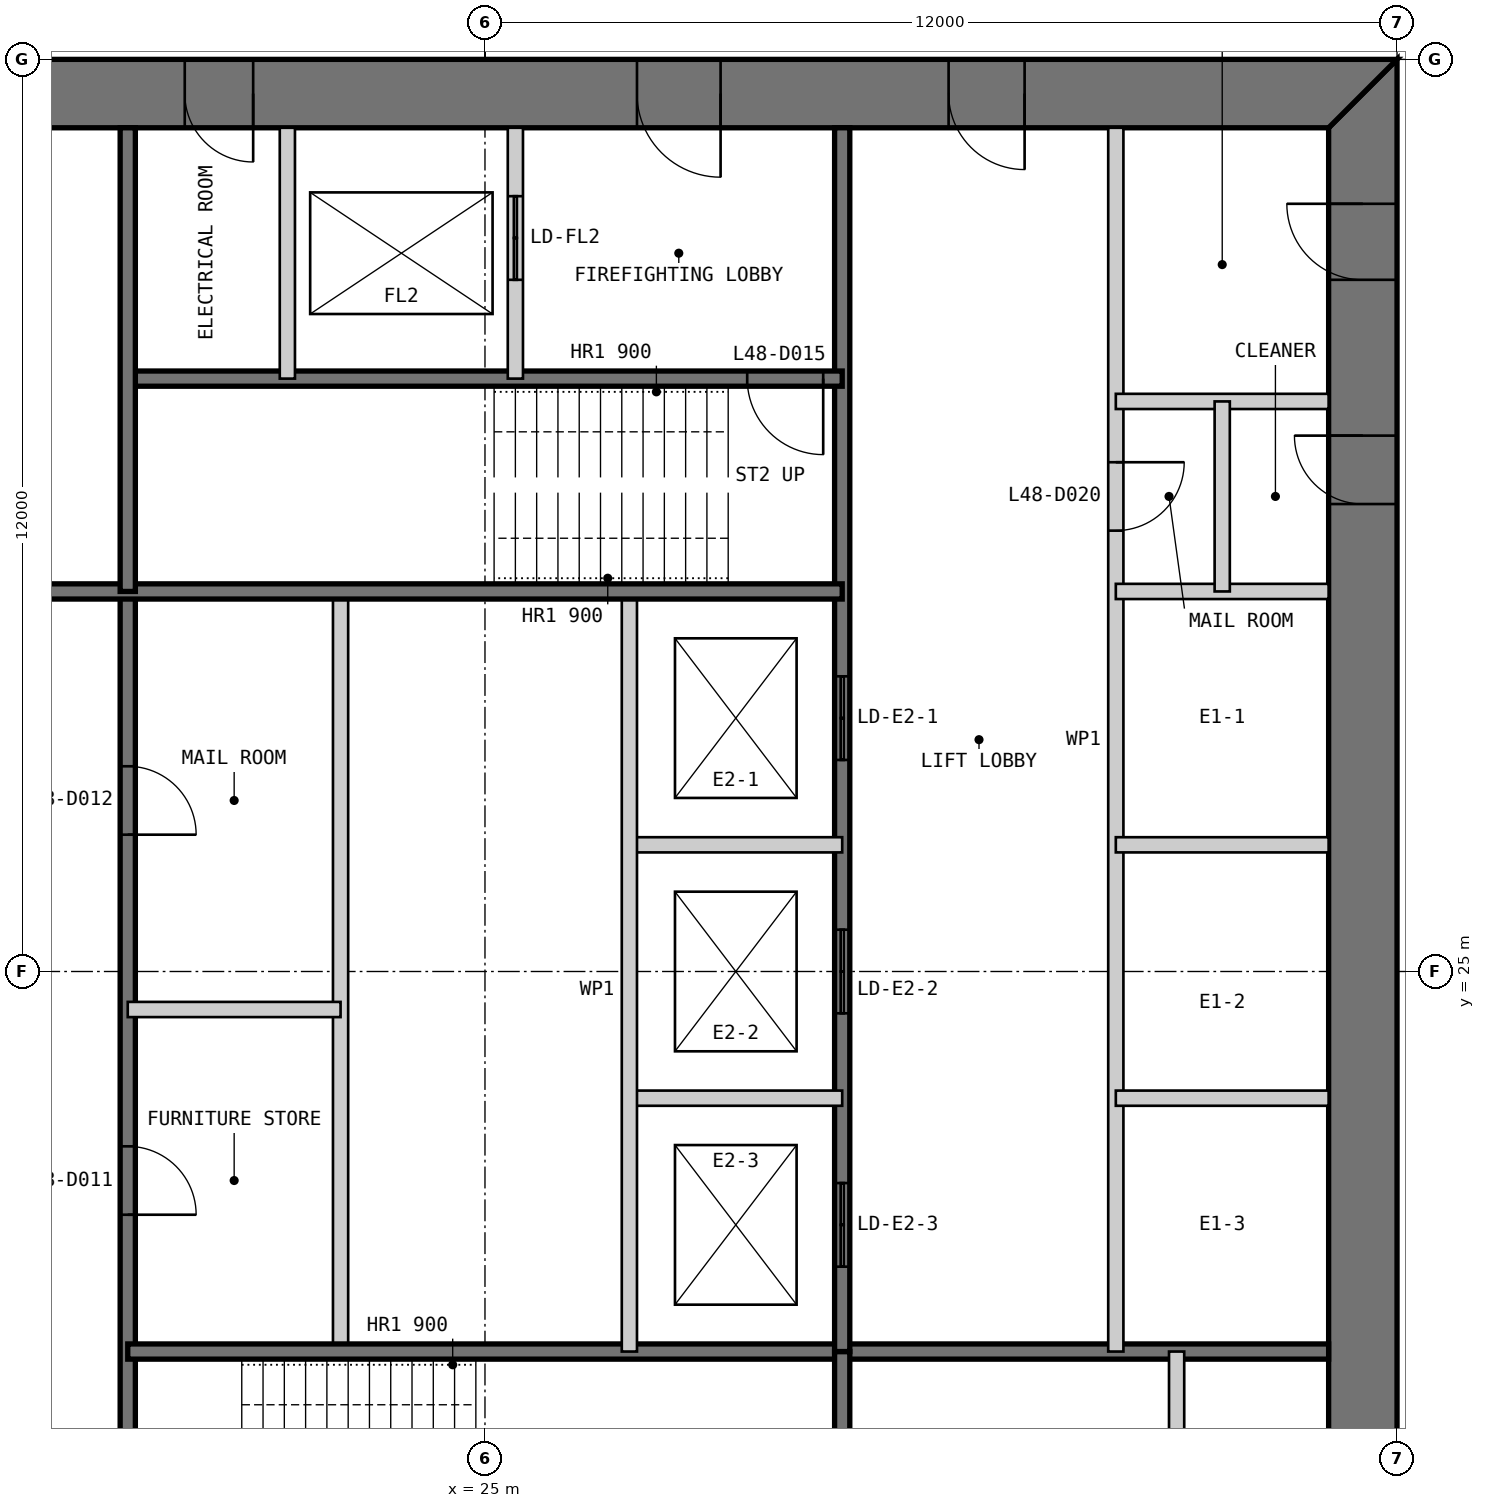
"""IFC4 building model, lengths in metres.
Left out: names, types, materials, properties, quantities, classifications, styles, units other than length and angle.
Written with IfcOpenShell. Run it as: python <this file> out.ifc"""

import sys

from ifc_helpers import new_model, si_unit, direction, frame, frame_2d, origin, place, context, subcontext, project, spatial, polyline, rectangle, outline, extrude, element, fill, save


model = new_model("IFC4")
c1 = context("Model", 3, precision=1e-05, world=origin(), true_north=direction((0.0, 1.0)))
c2 = subcontext(c1, "Body", "Model", "MODEL_VIEW")
j1 = project(units=[si_unit("LENGTHUNIT", "METRE"), si_unit("PLANEANGLEUNIT", "RADIAN")], contexts=[c1])
p1 = place(None, origin())
s1 = spatial("IfcSite", under=j1, at=p1, CompositionType="ELEMENT")
p2 = place(p1, origin())
s2 = spatial("IfcBuilding", under=s1, at=p2, CompositionType="ELEMENT")
p3 = place(p2, frame((0.0, 0.0, 205.8)))
s3 = spatial("IfcBuildingStorey", under=s2, at=p3, CompositionType="ELEMENT", Elevation=205.8)
p4 = place(p3, frame((36.55, 13.9, 0.0), z_axis=(0.0, 0.0, 1.0), x_axis=(0.0, 1.0, 0.0)))
e1 = element("IfcWall", 1, at=p4, inside=s3, PredefinedType="SHEAR", context=c2, shape_type="SweptSolid", body=[
    extrude(outline(polyline([(-0.9, -0.45), (23.1, -0.45), (22.2, 0.45), (0.0, 0.45), (-0.9, -0.45)])), origin(), (0.0, 0.0, 1.0), 4.0),
])
p5 = place(p4, frame((20.2, 0.0, 0.0)))
e2 = element("IfcOpeningElement", 2, at=p5, cuts=e1, PredefinedType="OPENING", context=c2, shape_type="SweptSolid", body=[
    extrude(rectangle(XDim=1.0, YDim=2.2, at=frame_2d((0.5, 1.1))), frame((0.0, 0.46, 0.0), z_axis=(0.0, -1.0, 0.0), x_axis=(1.0, 0.0, 0.0)), (0.0, 0.0, 1.0), 0.92),
])
p6 = place(p4, frame((17.25, 0.0, 0.0)))
e3 = element("IfcOpeningElement", 3, at=p6, cuts=e1, PredefinedType="OPENING", context=c2, shape_type="SweptSolid", body=[
    extrude(rectangle(XDim=0.9, YDim=2.2, at=frame_2d((0.45, 1.1))), frame((0.0, 0.46, 0.0), z_axis=(0.0, -1.0, 0.0), x_axis=(1.0, 0.0, 0.0)), (0.0, 0.0, 1.0), 0.92),
])
p7 = place(p3, frame((37.0, 36.55, 0.0), z_axis=(0.0, 0.0, 1.0), x_axis=(-1.0, 0.0, 0.0)))
e4 = element("IfcWall", 4, at=p7, inside=s3, PredefinedType="SHEAR", context=c2, shape_type="SweptSolid", body=[
    extrude(outline(polyline([(0.0, -0.45), (24.0, -0.45), (23.1, 0.45), (0.9, 0.45), (0.0, -0.45)])), origin(), (0.0, 0.0, 1.0), 4.0),
])
p8 = place(p7, frame((4.9, 0.0, 0.0)))
e5 = element("IfcOpeningElement", 5, at=p8, cuts=e4, PredefinedType="OPENING", context=c2, shape_type="SweptSolid", body=[
    extrude(rectangle(XDim=1.0, YDim=2.2, at=frame_2d((0.5, 1.1))), frame((0.0, 0.46, 0.0), z_axis=(0.0, -1.0, 0.0), x_axis=(1.0, 0.0, 0.0)), (0.0, 0.0, 1.0), 0.92),
])
p9 = place(p7, frame((8.9, 0.0, 0.0)))
e6 = element("IfcOpeningElement", 6, at=p9, cuts=e4, PredefinedType="OPENING", context=c2, shape_type="SweptSolid", body=[
    extrude(rectangle(XDim=1.1, YDim=2.2, at=frame_2d((0.55, 1.1))), frame((0.0, 0.46, 0.0), z_axis=(0.0, -1.0, 0.0), x_axis=(1.0, 0.0, 0.0)), (0.0, 0.0, 1.0), 0.92),
])
p10 = place(p7, frame((15.05, 0.0, 0.0)))
e7 = element("IfcOpeningElement", 7, at=p10, cuts=e4, PredefinedType="OPENING", context=c2, shape_type="SweptSolid", body=[
    extrude(rectangle(XDim=0.9, YDim=2.2, at=frame_2d((0.45, 1.1))), frame((0.0, 0.46, 0.0), z_axis=(0.0, -1.0, 0.0), x_axis=(1.0, 0.0, 0.0)), (0.0, 0.0, 1.0), 0.92),
])
p11 = place(p7, frame((17.9, 0.0, 0.0)))
e8 = element("IfcOpeningElement", 8, at=p11, cuts=e4, PredefinedType="OPENING", context=c2, shape_type="SweptSolid", body=[
    extrude(rectangle(XDim=1.0, YDim=2.2, at=frame_2d((0.5, 1.1))), frame((0.0, 0.46, 0.0), z_axis=(0.0, -1.0, 0.0), x_axis=(1.0, 0.0, 0.0)), (0.0, 0.0, 1.0), 0.92),
])
p12 = place(p7, frame((21.4, 0.0, 0.0)))
e9 = element("IfcOpeningElement", 9, at=p12, cuts=e4, PredefinedType="OPENING", context=c2, shape_type="SweptSolid", body=[
    extrude(rectangle(XDim=1.0, YDim=2.2, at=frame_2d((0.5, 1.1))), frame((0.0, 0.46, 0.0), z_axis=(0.0, -1.0, 0.0), x_axis=(1.0, 0.0, 0.0)), (0.0, 0.0, 1.0), 0.92),
])
p13 = place(p3, frame((20.3, 13.9, 0.0), z_axis=(0.0, 0.0, 1.0), x_axis=(0.0, 1.0, 0.0)))
e10 = element("IfcWall", 10, at=p13, inside=s3, PredefinedType="SOLIDWALL", context=c2, shape_type="SweptSolid", body=[
    extrude(rectangle(XDim=16.1, YDim=0.2, at=frame_2d((8.05, 0.0))), origin(), (0.0, 0.0, 1.0), 3.8),
])
p14 = place(p13, frame((7.9, 0.0, 0.0)))
e11 = element("IfcOpeningElement", 11, at=p14, cuts=e10, PredefinedType="OPENING", context=c2, shape_type="SweptSolid", body=[
    extrude(rectangle(XDim=0.9, YDim=2.2, at=frame_2d((0.45, 1.1))), frame((0.0, 0.11, 0.0), z_axis=(0.0, -1.0, 0.0), x_axis=(1.0, 0.0, 0.0)), (0.0, 0.0, 1.0), 0.22),
])
p15 = place(p13, frame((12.9, 0.0, 0.0)))
e12 = element("IfcOpeningElement", 12, at=p15, cuts=e10, PredefinedType="OPENING", context=c2, shape_type="SweptSolid", body=[
    extrude(rectangle(XDim=0.9, YDim=2.2, at=frame_2d((0.45, 1.1))), frame((0.0, 0.11, 0.0), z_axis=(0.0, -1.0, 0.0), x_axis=(1.0, 0.0, 0.0)), (0.0, 0.0, 1.0), 0.22),
])
p16 = place(p3, frame((23.1, 20.0, 0.0), z_axis=(0.0, 0.0, 1.0), x_axis=(0.0, 1.0, 0.0)))
e13 = element("IfcWall", 13, at=p16, inside=s3, PredefinedType="PARTITIONING", context=c2, shape_type="SweptSolid", body=[
    extrude(rectangle(XDim=10.0, YDim=0.2, at=frame_2d((5.0, 0.0))), origin(), (0.0, 0.0, 1.0), 3.8),
])
p17 = place(p3, frame((20.3, 20.0, 0.0), z_axis=(0.0, 0.0, 1.0), x_axis=(1.0, 0.0, 0.0)))
e14 = element("IfcWall", 14, at=p17, inside=s3, PredefinedType="SOLIDWALL", context=c2, shape_type="SweptSolid", body=[
    extrude(rectangle(XDim=15.8, YDim=0.2, at=frame_2d((7.9, 0.0))), origin(), (0.0, 0.0, 1.0), 3.8),
])
p18 = place(p3, frame((29.7, 13.9, 0.0), z_axis=(0.0, 0.0, 1.0), x_axis=(0.0, 1.0, 0.0)))
e15 = element("IfcWall", 15, at=p18, inside=s3, PredefinedType="SOLIDWALL", context=c2, shape_type="SweptSolid", body=[
    extrude(rectangle(XDim=6.1, YDim=0.2, at=frame_2d((3.05, 0.0))), origin(), (0.0, 0.0, 1.0), 3.8),
])
p19 = place(p3, frame((34.1, 13.9, 0.0), z_axis=(0.0, 0.0, 1.0), x_axis=(0.0, 1.0, 0.0)))
e16 = element("IfcWall", 16, at=p19, inside=s3, PredefinedType="PARTITIONING", context=c2, shape_type="SweptSolid", body=[
    extrude(rectangle(XDim=6.1, YDim=0.2, at=frame_2d((3.05, 0.0))), origin(), (0.0, 0.0, 1.0), 3.8),
])
p20 = place(p3, frame((20.3, 24.5, 0.0), z_axis=(0.0, 0.0, 1.0), x_axis=(1.0, 0.0, 0.0)))
e17 = element("IfcWall", 17, at=p20, inside=s3, PredefinedType="PARTITIONING", context=c2, shape_type="SweptSolid", body=[
    extrude(rectangle(XDim=2.8, YDim=0.2, at=frame_2d((1.4, 0.0))), origin(), (0.0, 0.0, 1.0), 3.8),
])
p21 = place(p3, frame((33.3, 36.1, 0.0), z_axis=(0.0, 0.0, 1.0), x_axis=(0.0, -1.0, 0.0)))
e18 = element("IfcWall", 18, at=p21, inside=s3, PredefinedType="PARTITIONING", context=c2, shape_type="SweptSolid", body=[
    extrude(rectangle(XDim=16.1, YDim=0.2, at=frame_2d((8.05, 0.0))), origin(), (0.0, 0.0, 1.0), 3.8),
])
p22 = place(p21, frame((4.4, 0.0, 0.0)))
e19 = element("IfcOpeningElement", 19, at=p22, cuts=e18, PredefinedType="OPENING", context=c2, shape_type="SweptSolid", body=[
    extrude(rectangle(XDim=0.9, YDim=2.2, at=frame_2d((0.45, 1.1))), frame((0.0, 0.11, 0.0), z_axis=(0.0, -1.0, 0.0), x_axis=(1.0, 0.0, 0.0)), (0.0, 0.0, 1.0), 0.22),
])
p23 = place(p3, frame((29.7, 36.1, 0.0), z_axis=(0.0, 0.0, 1.0), x_axis=(0.0, -1.0, 0.0)))
e20 = element("IfcWall", 20, at=p23, inside=s3, PredefinedType="SOLIDWALL", context=c2, shape_type="SweptSolid", body=[
    extrude(rectangle(XDim=16.1, YDim=0.2, at=frame_2d((8.05, 0.0))), origin(), (0.0, 0.0, 1.0), 3.8),
])
p24 = place(p23, frame((7.217, 0.0, 0.0)))
e21 = element("IfcOpeningElement", 21, at=p24, cuts=e20, PredefinedType="OPENING", context=c2, shape_type="SweptSolid", body=[
    extrude(rectangle(XDim=1.1, YDim=2.2, at=frame_2d((0.55, 1.1))), frame((0.0, 0.11, 0.0), z_axis=(0.0, -1.0, 0.0), x_axis=(1.0, 0.0, 0.0)), (0.0, 0.0, 1.0), 0.22),
])
p25 = place(p23, frame((10.55, 0.0, 0.0)))
e22 = element("IfcOpeningElement", 22, at=p25, cuts=e20, PredefinedType="OPENING", context=c2, shape_type="SweptSolid", body=[
    extrude(rectangle(XDim=1.1, YDim=2.2, at=frame_2d((0.55, 1.1))), frame((0.0, 0.11, 0.0), z_axis=(0.0, -1.0, 0.0), x_axis=(1.0, 0.0, 0.0)), (0.0, 0.0, 1.0), 0.22),
])
p26 = place(p23, frame((13.883, 0.0, 0.0)))
e23 = element("IfcOpeningElement", 23, at=p26, cuts=e20, PredefinedType="OPENING", context=c2, shape_type="SweptSolid", body=[
    extrude(rectangle(XDim=1.1, YDim=2.2, at=frame_2d((0.55, 1.1))), frame((0.0, 0.11, 0.0), z_axis=(0.0, -1.0, 0.0), x_axis=(1.0, 0.0, 0.0)), (0.0, 0.0, 1.0), 0.22),
])
for number, where, z_axis, x_axis in (
    (24, (36.1, 30.0, 0.0), (0.0, 0.0, 1.0), (-1.0, 0.0, 0.0)),
    (25, (36.1, 26.667, 0.0), (0.0, 0.0, 1.0), (-1.0, 0.0, 0.0)),
    (26, (36.1, 23.333, 0.0), (0.0, 0.0, 1.0), (-1.0, 0.0, 0.0)),
    (27, (29.7, 26.667, 0.0), (0.0, 0.0, 1.0), (-1.0, 0.0, 0.0)),
    (28, (29.7, 23.333, 0.0), (0.0, 0.0, 1.0), (-1.0, 0.0, 0.0)),
):
    element("IfcWall", number, at=place(p3, frame(where, z_axis=z_axis, x_axis=x_axis)), inside=s3, PredefinedType="PARTITIONING", context=c2, shape_type="SweptSolid", body=[
        extrude(rectangle(XDim=2.8, YDim=0.2, at=frame_2d((1.4, 0.0))), origin(), (0.0, 0.0, 1.0), 3.8),
    ])
p27 = place(p3, frame((26.9, 30.0, 0.0), z_axis=(0.0, 0.0, 1.0), x_axis=(0.0, -1.0, 0.0)))
e29 = element("IfcWall", 29, at=p27, inside=s3, PredefinedType="PARTITIONING", context=c2, shape_type="SweptSolid", body=[
    extrude(rectangle(XDim=10.0, YDim=0.2, at=frame_2d((5.0, 0.0))), origin(), (0.0, 0.0, 1.0), 3.8),
])
p28 = place(p3, frame((29.7, 32.8, 0.0), z_axis=(0.0, 0.0, 1.0), x_axis=(-1.0, 0.0, 0.0)))
e30 = element("IfcWall", 30, at=p28, inside=s3, PredefinedType="SOLIDWALL", context=c2, shape_type="SweptSolid", body=[
    extrude(rectangle(XDim=9.4, YDim=0.2, at=frame_2d((4.7, 0.0))), origin(), (0.0, 0.0, 1.0), 3.8),
])
p29 = place(p28, frame((0.25, 0.0, 0.0)))
e31 = element("IfcOpeningElement", 31, at=p29, cuts=e30, PredefinedType="OPENING", context=c2, shape_type="SweptSolid", body=[
    extrude(rectangle(XDim=1.0, YDim=2.2, at=frame_2d((0.5, 1.1))), frame((0.0, 0.11, 0.0), z_axis=(0.0, -1.0, 0.0), x_axis=(1.0, 0.0, 0.0)), (0.0, 0.0, 1.0), 0.22),
])
p30 = place(p3, frame((29.7, 30.0, 0.0), z_axis=(0.0, 0.0, 1.0), x_axis=(-1.0, 0.0, 0.0)))
e32 = element("IfcWall", 32, at=p30, inside=s3, PredefinedType="SOLIDWALL", context=c2, shape_type="SweptSolid", body=[
    extrude(rectangle(XDim=15.8, YDim=0.2, at=frame_2d((7.9, 0.0))), origin(), (0.0, 0.0, 1.0), 3.8),
])
p31 = place(p3, frame((25.4, 36.1, 0.0), z_axis=(0.0, 0.0, 1.0), x_axis=(0.0, -1.0, 0.0)))
e33 = element("IfcWall", 33, at=p31, inside=s3, PredefinedType="PARTITIONING", context=c2, shape_type="SweptSolid", body=[
    extrude(rectangle(XDim=3.3, YDim=0.2, at=frame_2d((1.65, 0.0))), origin(), (0.0, 0.0, 1.0), 3.8),
])
p32 = place(p31, frame((0.9, 0.0, 0.0)))
e34 = element("IfcOpeningElement", 34, at=p32, cuts=e33, PredefinedType="OPENING", context=c2, shape_type="SweptSolid", body=[
    extrude(rectangle(XDim=1.1, YDim=2.2, at=frame_2d((0.55, 1.1))), frame((0.0, 0.11, 0.0), z_axis=(0.0, -1.0, 0.0), x_axis=(1.0, 0.0, 0.0)), (0.0, 0.0, 1.0), 0.22),
])
p33 = place(p3, frame((22.4, 36.1, 0.0), z_axis=(0.0, 0.0, 1.0), x_axis=(0.0, -1.0, 0.0)))
e35 = element("IfcWall", 35, at=p33, inside=s3, PredefinedType="PARTITIONING", context=c2, shape_type="SweptSolid", body=[
    extrude(rectangle(XDim=3.3, YDim=0.2, at=frame_2d((1.65, 0.0))), origin(), (0.0, 0.0, 1.0), 3.8),
])
p34 = place(p3, frame((20.3, 36.1, 0.0), z_axis=(0.0, 0.0, 1.0), x_axis=(0.0, -1.0, 0.0)))
e36 = element("IfcWall", 36, at=p34, inside=s3, PredefinedType="SOLIDWALL", context=c2, shape_type="SweptSolid", body=[
    extrude(rectangle(XDim=6.1, YDim=0.2, at=frame_2d((3.05, 0.0))), origin(), (0.0, 0.0, 1.0), 3.8),
])
p35 = place(p3, frame((36.1, 32.5, 0.0), z_axis=(0.0, 0.0, 1.0), x_axis=(-1.0, 0.0, 0.0)))
e37 = element("IfcWall", 37, at=p35, inside=s3, PredefinedType="PARTITIONING", context=c2, shape_type="SweptSolid", body=[
    extrude(rectangle(XDim=2.8, YDim=0.2, at=frame_2d((1.4, 0.0))), origin(), (0.0, 0.0, 1.0), 3.8),
])
p36 = place(p3, frame((34.7, 32.5, 0.0), z_axis=(0.0, 0.0, 1.0), x_axis=(0.0, -1.0, 0.0)))
e38 = element("IfcWall", 38, at=p36, inside=s3, PredefinedType="PARTITIONING", context=c2, shape_type="SweptSolid", body=[
    extrude(rectangle(XDim=2.5, YDim=0.2, at=frame_2d((1.25, 0.0))), origin(), (0.0, 0.0, 1.0), 3.8),
])
p37 = place(p14, frame((0.9, 0.0, 0.0), z_axis=(0.0, 0.0, 1.0), x_axis=(-1.0, 0.0, 0.0)))
e39 = element("IfcDoor", 39, at=p37, inside=s3, OperationType="SINGLE_SWING_RIGHT", PredefinedType="DOOR", context=c2, shape_type="SweptSolid", body=[
    extrude(rectangle(XDim=0.9, YDim=2.2, at=frame_2d((0.45, 1.1))), frame((0.0, 0.025, 0.0), z_axis=(0.0, -1.0, 0.0), x_axis=(1.0, 0.0, 0.0)), (0.0, 0.0, 1.0), 0.05),
])
fill(e11, e39)
p38 = place(p15, frame((0.9, 0.0, 0.0), z_axis=(0.0, 0.0, 1.0), x_axis=(-1.0, 0.0, 0.0)))
e40 = element("IfcDoor", 40, at=p38, inside=s3, OperationType="SINGLE_SWING_RIGHT", PredefinedType="DOOR", context=c2, shape_type="SweptSolid", body=[
    extrude(rectangle(XDim=0.9, YDim=2.2, at=frame_2d((0.45, 1.1))), frame((0.0, 0.025, 0.0), z_axis=(0.0, -1.0, 0.0), x_axis=(1.0, 0.0, 0.0)), (0.0, 0.0, 1.0), 0.05),
])
fill(e12, e40)
p39 = place(p8, origin())
e41 = element("IfcDoor", 41, at=p39, inside=s3, OperationType="SINGLE_SWING_LEFT", PredefinedType="DOOR", context=c2, shape_type="SweptSolid", body=[
    extrude(rectangle(XDim=1.0, YDim=2.2, at=frame_2d((0.5, 1.1))), frame((0.0, 0.025, 0.0), z_axis=(0.0, -1.0, 0.0), x_axis=(1.0, 0.0, 0.0)), (0.0, 0.0, 1.0), 0.05),
    extrude(outline(polyline([(0.0, 0.0), (0.04, 0.0), (0.04, 2.16), (0.96, 2.16), (0.96, 0.0), (1.0, 0.0), (1.0, 2.2), (0.0, 2.2), (0.0, 0.0)])), frame((0.0, 0.3, 0.0), z_axis=(0.0, -1.0, 0.0), x_axis=(1.0, 0.0, 0.0)), (0.0, 0.0, 1.0), 0.6),
])
fill(e5, e41)
p40 = place(p9, origin())
e42 = element("IfcDoor", 42, at=p40, inside=s3, OperationType="SINGLE_SWING_LEFT", PredefinedType="DOOR", context=c2, shape_type="SweptSolid", body=[
    extrude(rectangle(XDim=1.1, YDim=2.2, at=frame_2d((0.55, 1.1))), frame((0.0, 0.025, 0.0), z_axis=(0.0, -1.0, 0.0), x_axis=(1.0, 0.0, 0.0)), (0.0, 0.0, 1.0), 0.05),
    extrude(outline(polyline([(0.0, 0.0), (0.04, 0.0), (0.04, 2.16), (1.06, 2.16), (1.06, 0.0), (1.1, 0.0), (1.1, 2.2), (0.0, 2.2), (0.0, 0.0)])), frame((0.0, 0.3, 0.0), z_axis=(0.0, -1.0, 0.0), x_axis=(1.0, 0.0, 0.0)), (0.0, 0.0, 1.0), 0.6),
])
fill(e6, e42)
p41 = place(p29, origin())
e43 = element("IfcDoor", 43, at=p41, inside=s3, OperationType="SINGLE_SWING_LEFT", PredefinedType="DOOR", context=c2, shape_type="SweptSolid", body=[
    extrude(rectangle(XDim=1.0, YDim=2.2, at=frame_2d((0.5, 1.1))), frame((0.0, 0.025, 0.0), z_axis=(0.0, -1.0, 0.0), x_axis=(1.0, 0.0, 0.0)), (0.0, 0.0, 1.0), 0.05),
])
fill(e31, e43)
p42 = place(p10, origin())
e44 = element("IfcDoor", 44, at=p42, inside=s3, OperationType="SINGLE_SWING_LEFT", PredefinedType="DOOR", context=c2, shape_type="SweptSolid", body=[
    extrude(rectangle(XDim=0.9, YDim=2.2, at=frame_2d((0.45, 1.1))), frame((0.0, 0.025, 0.0), z_axis=(0.0, -1.0, 0.0), x_axis=(1.0, 0.0, 0.0)), (0.0, 0.0, 1.0), 0.05),
    extrude(outline(polyline([(0.0, 0.0), (0.04, 0.0), (0.04, 2.16), (0.86, 2.16), (0.86, 0.0), (0.9, 0.0), (0.9, 2.2), (0.0, 2.2), (0.0, 0.0)])), frame((0.0, 0.3, 0.0), z_axis=(0.0, -1.0, 0.0), x_axis=(1.0, 0.0, 0.0)), (0.0, 0.0, 1.0), 0.6),
])
fill(e7, e44)
p43 = place(p5, origin())
e45 = element("IfcDoor", 45, at=p43, inside=s3, OperationType="SINGLE_SWING_RIGHT", PredefinedType="DOOR", context=c2, shape_type="SweptSolid", body=[
    extrude(rectangle(XDim=1.0, YDim=2.2, at=frame_2d((0.5, 1.1))), frame((0.0, 0.025, 0.0), z_axis=(0.0, -1.0, 0.0), x_axis=(1.0, 0.0, 0.0)), (0.0, 0.0, 1.0), 0.05),
    extrude(outline(polyline([(0.0, 0.0), (0.04, 0.0), (0.04, 2.16), (0.96, 2.16), (0.96, 0.0), (1.0, 0.0), (1.0, 2.2), (0.0, 2.2), (0.0, 0.0)])), frame((0.0, 0.3, 0.0), z_axis=(0.0, -1.0, 0.0), x_axis=(1.0, 0.0, 0.0)), (0.0, 0.0, 1.0), 0.6),
])
fill(e2, e45)
p44 = place(p22, origin())
e46 = element("IfcDoor", 46, at=p44, inside=s3, OperationType="SINGLE_SWING_LEFT", PredefinedType="DOOR", context=c2, shape_type="SweptSolid", body=[
    extrude(rectangle(XDim=0.9, YDim=2.2, at=frame_2d((0.45, 1.1))), frame((0.0, 0.025, 0.0), z_axis=(0.0, -1.0, 0.0), x_axis=(1.0, 0.0, 0.0)), (0.0, 0.0, 1.0), 0.05),
])
fill(e19, e46)
p45 = place(p6, origin())
e47 = element("IfcDoor", 47, at=p45, inside=s3, OperationType="SINGLE_SWING_RIGHT", PredefinedType="DOOR", context=c2, shape_type="SweptSolid", body=[
    extrude(rectangle(XDim=0.9, YDim=2.2, at=frame_2d((0.45, 1.1))), frame((0.0, 0.025, 0.0), z_axis=(0.0, -1.0, 0.0), x_axis=(1.0, 0.0, 0.0)), (0.0, 0.0, 1.0), 0.05),
    extrude(outline(polyline([(0.0, 0.0), (0.04, 0.0), (0.04, 2.16), (0.86, 2.16), (0.86, 0.0), (0.9, 0.0), (0.9, 2.2), (0.0, 2.2), (0.0, 0.0)])), frame((0.0, 0.3, 0.0), z_axis=(0.0, -1.0, 0.0), x_axis=(1.0, 0.0, 0.0)), (0.0, 0.0, 1.0), 0.6),
])
fill(e3, e47)
p46 = place(p32, origin())
e48 = element("IfcDoor", 48, at=p46, inside=s3, OperationType="DOUBLE_DOOR_SLIDING", PredefinedType="DOOR", context=c2, shape_type="SweptSolid", body=[
    extrude(rectangle(XDim=1.1, YDim=2.2, at=frame_2d((0.55, 1.1))), frame((0.0, 0.025, 0.0), z_axis=(0.0, -1.0, 0.0), x_axis=(1.0, 0.0, 0.0)), (0.0, 0.0, 1.0), 0.05),
])
fill(e34, e48)
p47 = place(p24, origin())
e49 = element("IfcDoor", 49, at=p47, inside=s3, OperationType="DOUBLE_DOOR_SLIDING", PredefinedType="DOOR", context=c2, shape_type="SweptSolid", body=[
    extrude(rectangle(XDim=1.1, YDim=2.2, at=frame_2d((0.55, 1.1))), frame((0.0, 0.025, 0.0), z_axis=(0.0, -1.0, 0.0), x_axis=(1.0, 0.0, 0.0)), (0.0, 0.0, 1.0), 0.05),
])
fill(e21, e49)
p48 = place(p25, origin())
e50 = element("IfcDoor", 50, at=p48, inside=s3, OperationType="DOUBLE_DOOR_SLIDING", PredefinedType="DOOR", context=c2, shape_type="SweptSolid", body=[
    extrude(rectangle(XDim=1.1, YDim=2.2, at=frame_2d((0.55, 1.1))), frame((0.0, 0.025, 0.0), z_axis=(0.0, -1.0, 0.0), x_axis=(1.0, 0.0, 0.0)), (0.0, 0.0, 1.0), 0.05),
])
fill(e22, e50)
p49 = place(p26, origin())
e51 = element("IfcDoor", 51, at=p49, inside=s3, OperationType="DOUBLE_DOOR_SLIDING", PredefinedType="DOOR", context=c2, shape_type="SweptSolid", body=[
    extrude(rectangle(XDim=1.1, YDim=2.2, at=frame_2d((0.55, 1.1))), frame((0.0, 0.025, 0.0), z_axis=(0.0, -1.0, 0.0), x_axis=(1.0, 0.0, 0.0)), (0.0, 0.0, 1.0), 0.05),
])
fill(e23, e51)
save(model, sys.argv[1])
